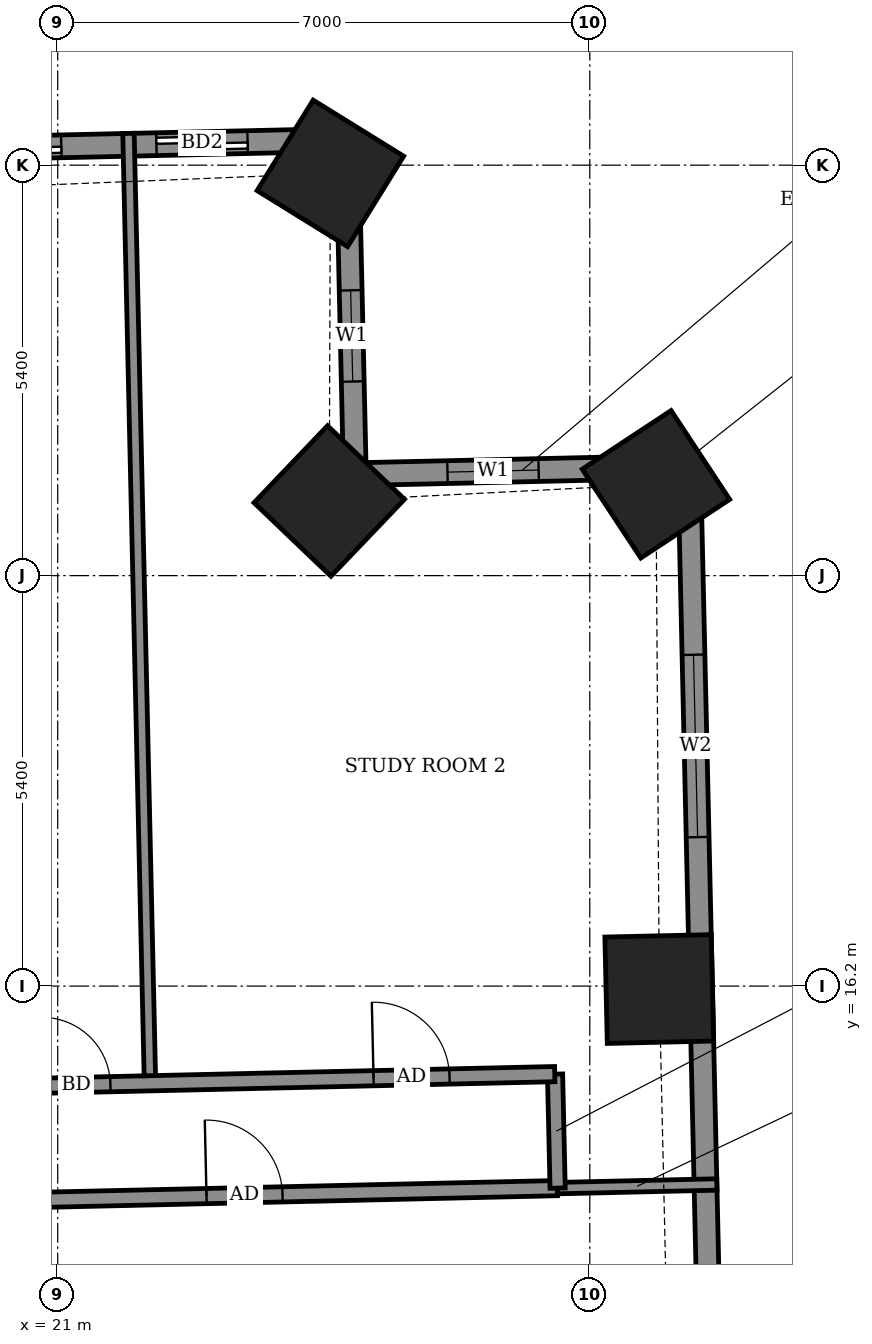
"""IFC4 building model, lengths in metres.
Left out: names, types, materials, properties, quantities, classifications, styles, units other than length and angle.
Written with IfcOpenShell. Run it as: python <this file> out.ifc"""

import sys

from ifc_helpers import new_model, si_unit, direction, frame, frame_2d, origin, origin_2d, place, context, subcontext, project, spatial, rectangle, extrude, element, fill, save


model = new_model("IFC4")
c1 = context("Model", 3, precision=1e-05, world=origin(), true_north=direction((0.0, 1.0)))
c2 = subcontext(c1, "Body", "Model", "MODEL_VIEW")
j1 = project(units=[si_unit("LENGTHUNIT", "METRE"), si_unit("PLANEANGLEUNIT", "RADIAN")], contexts=[c1])
p1 = place(None, origin())
s1 = spatial("IfcSite", under=j1, at=p1, CompositionType="ELEMENT")
p2 = place(p1, origin())
s2 = spatial("IfcBuilding", under=s1, at=p2, CompositionType="ELEMENT")
p3 = place(p2, frame((0.0, 0.0, 90.1)))
s3 = spatial("IfcBuildingStorey", under=s2, at=p3, CompositionType="ELEMENT", Elevation=90.1)
for number, where, z_axis, x_axis in (
    (1, (28.914, 16.161, -0.55), (0.0, 0.0, 1.0), (-0.023, 1.0, 0.0)),
    (2, (28.871, 22.802, -0.55), (0.0, 0.0, 1.0), (-0.551, 0.835, 0.0)),
    (3, (24.572, 22.582, -0.55), (0.0, 0.0, 1.0), (-0.723, 0.691, 0.0)),
    (4, (24.587, 26.892, -0.55), (0.0, 0.0, 1.0), (-0.85, 0.527, 0.0)),
):
    element("IfcColumn", number, at=place(p3, frame(where, z_axis=z_axis, x_axis=x_axis)), inside=s3, PredefinedType="COLUMN", context=c2, shape_type="SweptSolid", body=[
        extrude(rectangle(XDim=1.4, YDim=1.4, at=origin_2d()), origin(), (0.0, 0.0, 1.0), 3.6),
    ])
p4 = place(p3, frame((29.624, 9.108, 0.0), z_axis=(0.0, 0.0, 1.0), x_axis=(-0.022679601751, 0.999742784752, 0.0)))
e5 = element("IfcWall", 5, at=p4, inside=s3, PredefinedType="SOLIDWALL", context=c2, shape_type="SweptSolid", body=[
    extrude(rectangle(XDim=13.93, YDim=0.3, at=frame_2d((6.965, 0.0))), origin(), (0.0, 0.0, 1.0), 3.05),
])
p5 = place(p4, frame((1.742, 0.0, 0.0)))
e6 = element("IfcOpeningElement", 6, at=p5, cuts=e5, PredefinedType="OPENING", context=c2, shape_type="SweptSolid", body=[
    extrude(rectangle(XDim=1.5, YDim=2.4, at=frame_2d((0.75, 1.2))), frame((0.0, 0.16, 0.0), z_axis=(0.0, -1.0, 0.0), x_axis=(1.0, 0.0, 0.0)), (0.0, 0.0, 1.0), 0.32),
])
p6 = place(p4, frame((9.054, 0.0, 0.9)))
e7 = element("IfcOpeningElement", 7, at=p6, cuts=e5, PredefinedType="OPENING", context=c2, shape_type="SweptSolid", body=[
    extrude(rectangle(XDim=2.4, YDim=1.5, at=frame_2d((1.2, 0.75))), frame((0.0, 0.16, 0.0), z_axis=(0.0, -1.0, 0.0), x_axis=(1.0, 0.0, 0.0)), (0.0, 0.0, 1.0), 0.32),
])
p7 = place(p3, frame((29.308, 23.034, 0.0), z_axis=(0.0, 0.0, 1.0), x_axis=(-0.999742493928, -0.022692418004, 0.0)))
e8 = element("IfcWall", 8, at=p7, inside=s3, PredefinedType="SOLIDWALL", context=c2, shape_type="SweptSolid", body=[
    extrude(rectangle(XDim=4.4, YDim=0.3, at=frame_2d((2.2, 0.0))), origin(), (0.0, 0.0, 1.0), 2.55),
])
p8 = place(p7, frame((1.981, 0.0, 0.9)))
e9 = element("IfcOpeningElement", 9, at=p8, cuts=e8, PredefinedType="OPENING", context=c2, shape_type="SweptSolid", body=[
    extrude(rectangle(XDim=1.2, YDim=1.5, at=frame_2d((0.6, 0.75))), frame((0.0, 0.16, 0.0), z_axis=(0.0, -1.0, 0.0), x_axis=(1.0, 0.0, 0.0)), (0.0, 0.0, 1.0), 0.32),
])
p9 = place(p3, frame((24.909, 22.934, 0.0), z_axis=(0.0, 0.0, 1.0), x_axis=(-0.022693676786, 0.999742465355, 0.0)))
e10 = element("IfcWall", 10, at=p9, inside=s3, PredefinedType="SOLIDWALL", context=c2, shape_type="SweptSolid", body=[
    extrude(rectangle(XDim=4.4, YDim=0.3, at=frame_2d((2.2, 0.0))), origin(), (0.0, 0.0, 1.0), 2.55),
])
p10 = place(p9, frame((1.22, 0.0, 0.9)))
e11 = element("IfcOpeningElement", 11, at=p10, cuts=e10, PredefinedType="OPENING", context=c2, shape_type="SweptSolid", body=[
    extrude(rectangle(XDim=1.2, YDim=1.5, at=frame_2d((0.6, 0.75))), frame((0.0, 0.16, 0.0), z_axis=(0.0, -1.0, 0.0), x_axis=(1.0, 0.0, 0.0)), (0.0, 0.0, 1.0), 0.32),
])
p11 = place(p3, frame((24.809, 27.333, 0.0), z_axis=(0.0, 0.0, 1.0), x_axis=(-0.999742489858, -0.022692597327, 0.0)))
e12 = element("IfcWall", 12, at=p11, inside=s3, PredefinedType="SOLIDWALL", context=c2, shape_type="SweptSolid", body=[
    extrude(rectangle(XDim=46.972, YDim=0.3, at=frame_2d((23.486, 0.0))), origin(), (0.0, 0.0, 1.0), 3.05),
])
p12 = place(p11, frame((1.311, 0.0, 0.0)))
e13 = element("IfcOpeningElement", 13, at=p12, cuts=e12, PredefinedType="OPENING", context=c2, shape_type="SweptSolid", body=[
    extrude(rectangle(XDim=1.2, YDim=2.4, at=frame_2d((0.6, 1.2))), frame((0.0, 0.16, 0.0), z_axis=(0.0, -1.0, 0.0), x_axis=(1.0, 0.0, 0.0)), (0.0, 0.0, 1.0), 0.32),
])
p13 = place(p11, frame((3.763, 0.0, 0.0)))
e14 = element("IfcOpeningElement", 14, at=p13, cuts=e12, PredefinedType="OPENING", context=c2, shape_type="SweptSolid", body=[
    extrude(rectangle(XDim=1.5, YDim=2.4, at=frame_2d((0.75, 1.2))), frame((0.0, 0.16, 0.0), z_axis=(0.0, -1.0, 0.0), x_axis=(1.0, 0.0, 0.0)), (0.0, 0.0, 1.0), 0.32),
])
p14 = place(p11, frame((8.647, 0.0, 0.0)))
e15 = element("IfcOpeningElement", 15, at=p14, cuts=e12, PredefinedType="OPENING", context=c2, shape_type="SweptSolid", body=[
    extrude(rectangle(XDim=1.5, YDim=2.4, at=frame_2d((0.75, 1.2))), frame((0.0, 0.16, 0.0), z_axis=(0.0, -1.0, 0.0), x_axis=(1.0, 0.0, 0.0)), (0.0, 0.0, 1.0), 0.32),
])
p15 = place(p11, frame((14.239, 0.0, 0.0)))
e16 = element("IfcOpeningElement", 16, at=p15, cuts=e12, PredefinedType="OPENING", context=c2, shape_type="SweptSolid", body=[
    extrude(rectangle(XDim=1.2, YDim=2.4, at=frame_2d((0.6, 1.2))), frame((0.0, 0.16, 0.0), z_axis=(0.0, -1.0, 0.0), x_axis=(1.0, 0.0, 0.0)), (0.0, 0.0, 1.0), 0.32),
])
p16 = place(p11, frame((17.016, 0.0, 0.0)))
e17 = element("IfcOpeningElement", 17, at=p16, cuts=e12, PredefinedType="OPENING", context=c2, shape_type="SweptSolid", body=[
    extrude(rectangle(XDim=1.5, YDim=2.4, at=frame_2d((0.75, 1.2))), frame((0.0, 0.16, 0.0), z_axis=(0.0, -1.0, 0.0), x_axis=(1.0, 0.0, 0.0)), (0.0, 0.0, 1.0), 0.32),
])
p17 = place(p11, frame((21.816, 0.0, 0.0)))
e18 = element("IfcOpeningElement", 18, at=p17, cuts=e12, PredefinedType="OPENING", context=c2, shape_type="SweptSolid", body=[
    extrude(rectangle(XDim=1.5, YDim=2.4, at=frame_2d((0.75, 1.2))), frame((0.0, 0.16, 0.0), z_axis=(0.0, -1.0, 0.0), x_axis=(1.0, 0.0, 0.0)), (0.0, 0.0, 1.0), 0.32),
])
p18 = place(p11, frame((24.817, 0.0, 0.0)))
e19 = element("IfcOpeningElement", 19, at=p18, cuts=e12, PredefinedType="OPENING", context=c2, shape_type="SweptSolid", body=[
    extrude(rectangle(XDim=1.2, YDim=2.4, at=frame_2d((0.6, 1.2))), frame((0.0, 0.16, 0.0), z_axis=(0.0, -1.0, 0.0), x_axis=(1.0, 0.0, 0.0)), (0.0, 0.0, 1.0), 0.32),
])
p19 = place(p11, frame((30.244, 0.0, 0.0)))
e20 = element("IfcOpeningElement", 20, at=p19, cuts=e12, PredefinedType="OPENING", context=c2, shape_type="SweptSolid", body=[
    extrude(rectangle(XDim=1.5, YDim=2.4, at=frame_2d((0.75, 1.2))), frame((0.0, 0.16, 0.0), z_axis=(0.0, -1.0, 0.0), x_axis=(1.0, 0.0, 0.0)), (0.0, 0.0, 1.0), 0.32),
])
p20 = place(p11, frame((35.069, 0.0, 0.0)))
e21 = element("IfcOpeningElement", 21, at=p20, cuts=e12, PredefinedType="OPENING", context=c2, shape_type="SweptSolid", body=[
    extrude(rectangle(XDim=1.5, YDim=2.4, at=frame_2d((0.75, 1.2))), frame((0.0, 0.16, 0.0), z_axis=(0.0, -1.0, 0.0), x_axis=(1.0, 0.0, 0.0)), (0.0, 0.0, 1.0), 0.32),
])
p21 = place(p11, frame((37.995, 0.0, 0.0)))
e22 = element("IfcOpeningElement", 22, at=p21, cuts=e12, PredefinedType="OPENING", context=c2, shape_type="SweptSolid", body=[
    extrude(rectangle(XDim=1.5, YDim=2.4, at=frame_2d((0.75, 1.2))), frame((0.0, 0.16, 0.0), z_axis=(0.0, -1.0, 0.0), x_axis=(1.0, 0.0, 0.0)), (0.0, 0.0, 1.0), 0.32),
])
p22 = place(p11, frame((42.674, 0.0, 0.9)))
e23 = element("IfcOpeningElement", 23, at=p22, cuts=e12, PredefinedType="OPENING", context=c2, shape_type="SweptSolid", body=[
    extrude(rectangle(XDim=2.4, YDim=1.5, at=frame_2d((1.2, 0.75))), frame((0.0, 0.16, 0.0), z_axis=(0.0, -1.0, 0.0), x_axis=(1.0, 0.0, 0.0)), (0.0, 0.0, 1.0), 0.32),
])
p23 = place(p3, frame((17.176, 13.306, 0.0), z_axis=(0.0, 0.0, 1.0), x_axis=(0.999742295888, 0.022701141223, 0.0)))
e24 = element("IfcWall", 24, at=p23, inside=s3, PredefinedType="PARTITIONING", context=c2, shape_type="SweptSolid", body=[
    extrude(rectangle(XDim=10.4, YDim=0.2, at=frame_2d((5.2, 0.0))), origin(), (0.0, 0.0, 1.0), 3.05),
])
p24 = place(p23, frame((5.783, 0.0, 0.0)))
e25 = element("IfcOpeningElement", 25, at=p24, cuts=e24, PredefinedType="OPENING", context=c2, shape_type="SweptSolid", body=[
    extrude(rectangle(XDim=1.0, YDim=2.1, at=frame_2d((0.5, 1.05))), frame((0.0, 0.11, 0.0), z_axis=(0.0, -1.0, 0.0), x_axis=(1.0, 0.0, 0.0)), (0.0, 0.0, 1.0), 0.22),
])
p25 = place(p3, frame((27.573, 13.542, 0.0), z_axis=(0.0, 0.0, 1.0), x_axis=(0.999737616439, 0.022906293375, 0.0)))
e26 = element("IfcWall", 26, at=p25, inside=s3, PredefinedType="PARTITIONING", context=c2, shape_type="SweptSolid", body=[
    extrude(rectangle(XDim=2.1, YDim=0.15, at=frame_2d((1.05, 0.0))), origin(), (0.0, 0.0, 1.0), 2.55),
])
p26 = place(p3, frame((27.577, 13.542, 0.0), z_axis=(0.0, 0.0, 1.0), x_axis=(-0.022617910375, 0.999744182344, 0.0)))
e27 = element("IfcWall", 27, at=p26, inside=s3, PredefinedType="PARTITIONING", context=c2, shape_type="SweptSolid", body=[
    extrude(rectangle(XDim=1.5, YDim=0.2, at=frame_2d((0.75, 0.0))), origin(), (0.0, 0.0, 1.0), 3.05),
])
p27 = place(p3, frame((-24.92, 13.851, 0.0), z_axis=(0.0, 0.0, 1.0), x_axis=(0.999742411711, 0.022696039895, 0.0)))
e28 = element("IfcWall", 28, at=p27, inside=s3, PredefinedType="PARTITIONING", context=c2, shape_type="SweptSolid", body=[
    extrude(rectangle(XDim=52.472, YDim=0.2, at=frame_2d((26.236, 0.0))), origin(), (0.0, 0.0, 1.0), 3.05),
])
p28 = place(p27, frame((50.088, 0.0, 0.0)))
e29 = element("IfcOpeningElement", 29, at=p28, cuts=e28, PredefinedType="OPENING", context=c2, shape_type="SweptSolid", body=[
    extrude(rectangle(XDim=1.0, YDim=2.1, at=frame_2d((0.5, 1.05))), frame((0.0, 0.11, 0.0), z_axis=(0.0, -1.0, 0.0), x_axis=(1.0, 0.0, 0.0)), (0.0, 0.0, 1.0), 0.22),
])
p29 = place(p27, frame((45.725, 0.0, 0.0)))
e30 = element("IfcOpeningElement", 30, at=p29, cuts=e28, PredefinedType="OPENING", context=c2, shape_type="SweptSolid", body=[
    extrude(rectangle(XDim=0.9, YDim=2.1, at=frame_2d((0.45, 1.05))), frame((0.0, 0.11, 0.0), z_axis=(0.0, -1.0, 0.0), x_axis=(1.0, 0.0, 0.0)), (0.0, 0.0, 1.0), 0.22),
])
p30 = place(p27, frame((38.975, 0.0, 0.0)))
e31 = element("IfcOpeningElement", 31, at=p30, cuts=e28, PredefinedType="OPENING", context=c2, shape_type="SweptSolid", body=[
    extrude(rectangle(XDim=0.9, YDim=2.1, at=frame_2d((0.45, 1.05))), frame((0.0, 0.11, 0.0), z_axis=(0.0, -1.0, 0.0), x_axis=(1.0, 0.0, 0.0)), (0.0, 0.0, 1.0), 0.22),
])
p31 = place(p27, frame((37.05, 0.0, 0.0)))
e32 = element("IfcOpeningElement", 32, at=p31, cuts=e28, PredefinedType="OPENING", context=c2, shape_type="SweptSolid", body=[
    extrude(rectangle(XDim=0.9, YDim=2.1, at=frame_2d((0.45, 1.05))), frame((0.0, 0.11, 0.0), z_axis=(0.0, -1.0, 0.0), x_axis=(1.0, 0.0, 0.0)), (0.0, 0.0, 1.0), 0.22),
])
p32 = place(p27, frame((30.35, 0.0, 0.0)))
e33 = element("IfcOpeningElement", 33, at=p32, cuts=e28, PredefinedType="OPENING", context=c2, shape_type="SweptSolid", body=[
    extrude(rectangle(XDim=0.9, YDim=2.1, at=frame_2d((0.45, 1.05))), frame((0.0, 0.11, 0.0), z_axis=(0.0, -1.0, 0.0), x_axis=(1.0, 0.0, 0.0)), (0.0, 0.0, 1.0), 0.22),
])
p33 = place(p27, frame((28.4, 0.0, 0.0)))
e34 = element("IfcOpeningElement", 34, at=p33, cuts=e28, PredefinedType="OPENING", context=c2, shape_type="SweptSolid", body=[
    extrude(rectangle(XDim=0.9, YDim=2.1, at=frame_2d((0.45, 1.05))), frame((0.0, 0.11, 0.0), z_axis=(0.0, -1.0, 0.0), x_axis=(1.0, 0.0, 0.0)), (0.0, 0.0, 1.0), 0.22),
])
p34 = place(p27, frame((21.675, 0.0, 0.0)))
e35 = element("IfcOpeningElement", 35, at=p34, cuts=e28, PredefinedType="OPENING", context=c2, shape_type="SweptSolid", body=[
    extrude(rectangle(XDim=0.9, YDim=2.1, at=frame_2d((0.45, 1.05))), frame((0.0, 0.11, 0.0), z_axis=(0.0, -1.0, 0.0), x_axis=(1.0, 0.0, 0.0)), (0.0, 0.0, 1.0), 0.22),
])
p35 = place(p27, frame((19.775, 0.0, 0.0)))
e36 = element("IfcOpeningElement", 36, at=p35, cuts=e28, PredefinedType="OPENING", context=c2, shape_type="SweptSolid", body=[
    extrude(rectangle(XDim=0.9, YDim=2.1, at=frame_2d((0.45, 1.05))), frame((0.0, 0.11, 0.0), z_axis=(0.0, -1.0, 0.0), x_axis=(1.0, 0.0, 0.0)), (0.0, 0.0, 1.0), 0.22),
])
p36 = place(p27, frame((13.0, 0.0, 0.0)))
e37 = element("IfcOpeningElement", 37, at=p36, cuts=e28, PredefinedType="OPENING", context=c2, shape_type="SweptSolid", body=[
    extrude(rectangle(XDim=0.9, YDim=2.1, at=frame_2d((0.45, 1.05))), frame((0.0, 0.11, 0.0), z_axis=(0.0, -1.0, 0.0), x_axis=(1.0, 0.0, 0.0)), (0.0, 0.0, 1.0), 0.22),
])
p37 = place(p27, frame((11.075, 0.0, 0.0)))
e38 = element("IfcOpeningElement", 38, at=p37, cuts=e28, PredefinedType="OPENING", context=c2, shape_type="SweptSolid", body=[
    extrude(rectangle(XDim=0.9, YDim=2.1, at=frame_2d((0.45, 1.05))), frame((0.0, 0.11, 0.0), z_axis=(0.0, -1.0, 0.0), x_axis=(1.0, 0.0, 0.0)), (0.0, 0.0, 1.0), 0.22),
])
p38 = place(p27, frame((3.049, 0.0, 0.0)))
e39 = element("IfcOpeningElement", 39, at=p38, cuts=e28, PredefinedType="OPENING", context=c2, shape_type="SweptSolid", body=[
    extrude(rectangle(XDim=1.0, YDim=2.1, at=frame_2d((0.5, 1.05))), frame((0.0, 0.11, 0.0), z_axis=(0.0, -1.0, 0.0), x_axis=(1.0, 0.0, 0.0)), (0.0, 0.0, 1.0), 0.22),
])
p39 = place(p3, frame((22.212, 15.021, 0.0), z_axis=(0.0, 0.0, 1.0), x_axis=(-0.022661475803, 0.999743195783, 0.0)))
e40 = element("IfcWall", 40, at=p39, inside=s3, PredefinedType="PARTITIONING", context=c2, shape_type="SweptSolid", body=[
    extrude(rectangle(XDim=12.4, YDim=0.15, at=frame_2d((6.2, 0.0))), origin(), (0.0, 0.0, 1.0), 2.55),
])
p40 = place(p6, origin())
e41 = element("IfcWindow", 41, at=p40, inside=s3, PartitioningType="DOUBLE_PANEL_VERTICAL", PredefinedType="WINDOW", context=c2, shape_type="SweptSolid", body=[
    extrude(rectangle(XDim=2.4, YDim=1.5, at=frame_2d((1.2, 0.75))), frame((0.0, 0.03, 0.0), z_axis=(0.0, -1.0, 0.0), x_axis=(1.0, 0.0, 0.0)), (0.0, 0.0, 1.0), 0.06),
])
fill(e7, e41)
p41 = place(p8, origin())
e42 = element("IfcWindow", 42, at=p41, inside=s3, PartitioningType="SINGLE_PANEL", PredefinedType="WINDOW", context=c2, shape_type="SweptSolid", body=[
    extrude(rectangle(XDim=1.2, YDim=1.5, at=frame_2d((0.6, 0.75))), frame((0.0, 0.03, 0.0), z_axis=(0.0, -1.0, 0.0), x_axis=(1.0, 0.0, 0.0)), (0.0, 0.0, 1.0), 0.06),
])
fill(e9, e42)
p42 = place(p10, origin())
e43 = element("IfcWindow", 43, at=p42, inside=s3, PartitioningType="SINGLE_PANEL", PredefinedType="WINDOW", context=c2, shape_type="SweptSolid", body=[
    extrude(rectangle(XDim=1.2, YDim=1.5, at=frame_2d((0.6, 0.75))), frame((0.0, 0.03, 0.0), z_axis=(0.0, -1.0, 0.0), x_axis=(1.0, 0.0, 0.0)), (0.0, 0.0, 1.0), 0.06),
])
fill(e11, e43)
p43 = place(p12, origin())
e44 = element("IfcDoor", 44, at=p43, inside=s3, OperationType="SLIDING_TO_LEFT", PredefinedType="DOOR", context=c2, shape_type="SweptSolid", body=[
    extrude(rectangle(XDim=1.2, YDim=2.4, at=frame_2d((0.6, 1.2))), frame((0.0, 0.025, 0.0), z_axis=(0.0, -1.0, 0.0), x_axis=(1.0, 0.0, 0.0)), (0.0, 0.0, 1.0), 0.05),
])
fill(e13, e44)
p44 = place(p13, origin())
e45 = element("IfcDoor", 45, at=p44, inside=s3, OperationType="SLIDING_TO_LEFT", PredefinedType="DOOR", context=c2, shape_type="SweptSolid", body=[
    extrude(rectangle(XDim=1.5, YDim=2.4, at=frame_2d((0.75, 1.2))), frame((0.0, 0.025, 0.0), z_axis=(0.0, -1.0, 0.0), x_axis=(1.0, 0.0, 0.0)), (0.0, 0.0, 1.0), 0.05),
])
fill(e14, e45)
p45 = place(p24, origin())
e46 = element("IfcDoor", 46, at=p45, inside=s3, OperationType="SINGLE_SWING_RIGHT", PredefinedType="DOOR", context=c2, shape_type="SweptSolid", body=[
    extrude(rectangle(XDim=1.0, YDim=2.1, at=frame_2d((0.5, 1.05))), frame((0.0, 0.025, 0.0), z_axis=(0.0, -1.0, 0.0), x_axis=(1.0, 0.0, 0.0)), (0.0, 0.0, 1.0), 0.05),
])
fill(e25, e46)
p46 = place(p28, origin())
e47 = element("IfcDoor", 47, at=p46, inside=s3, OperationType="SINGLE_SWING_LEFT", PredefinedType="DOOR", context=c2, shape_type="SweptSolid", body=[
    extrude(rectangle(XDim=1.0, YDim=2.1, at=frame_2d((0.5, 1.05))), frame((0.0, 0.025, 0.0), z_axis=(0.0, -1.0, 0.0), x_axis=(1.0, 0.0, 0.0)), (0.0, 0.0, 1.0), 0.05),
])
fill(e29, e47)
p47 = place(p29, origin())
e48 = element("IfcDoor", 48, at=p47, inside=s3, OperationType="SINGLE_SWING_LEFT", PredefinedType="DOOR", context=c2, shape_type="SweptSolid", body=[
    extrude(rectangle(XDim=0.9, YDim=2.1, at=frame_2d((0.45, 1.05))), frame((0.0, 0.025, 0.0), z_axis=(0.0, -1.0, 0.0), x_axis=(1.0, 0.0, 0.0)), (0.0, 0.0, 1.0), 0.05),
])
fill(e30, e48)
save(model, sys.argv[1])
